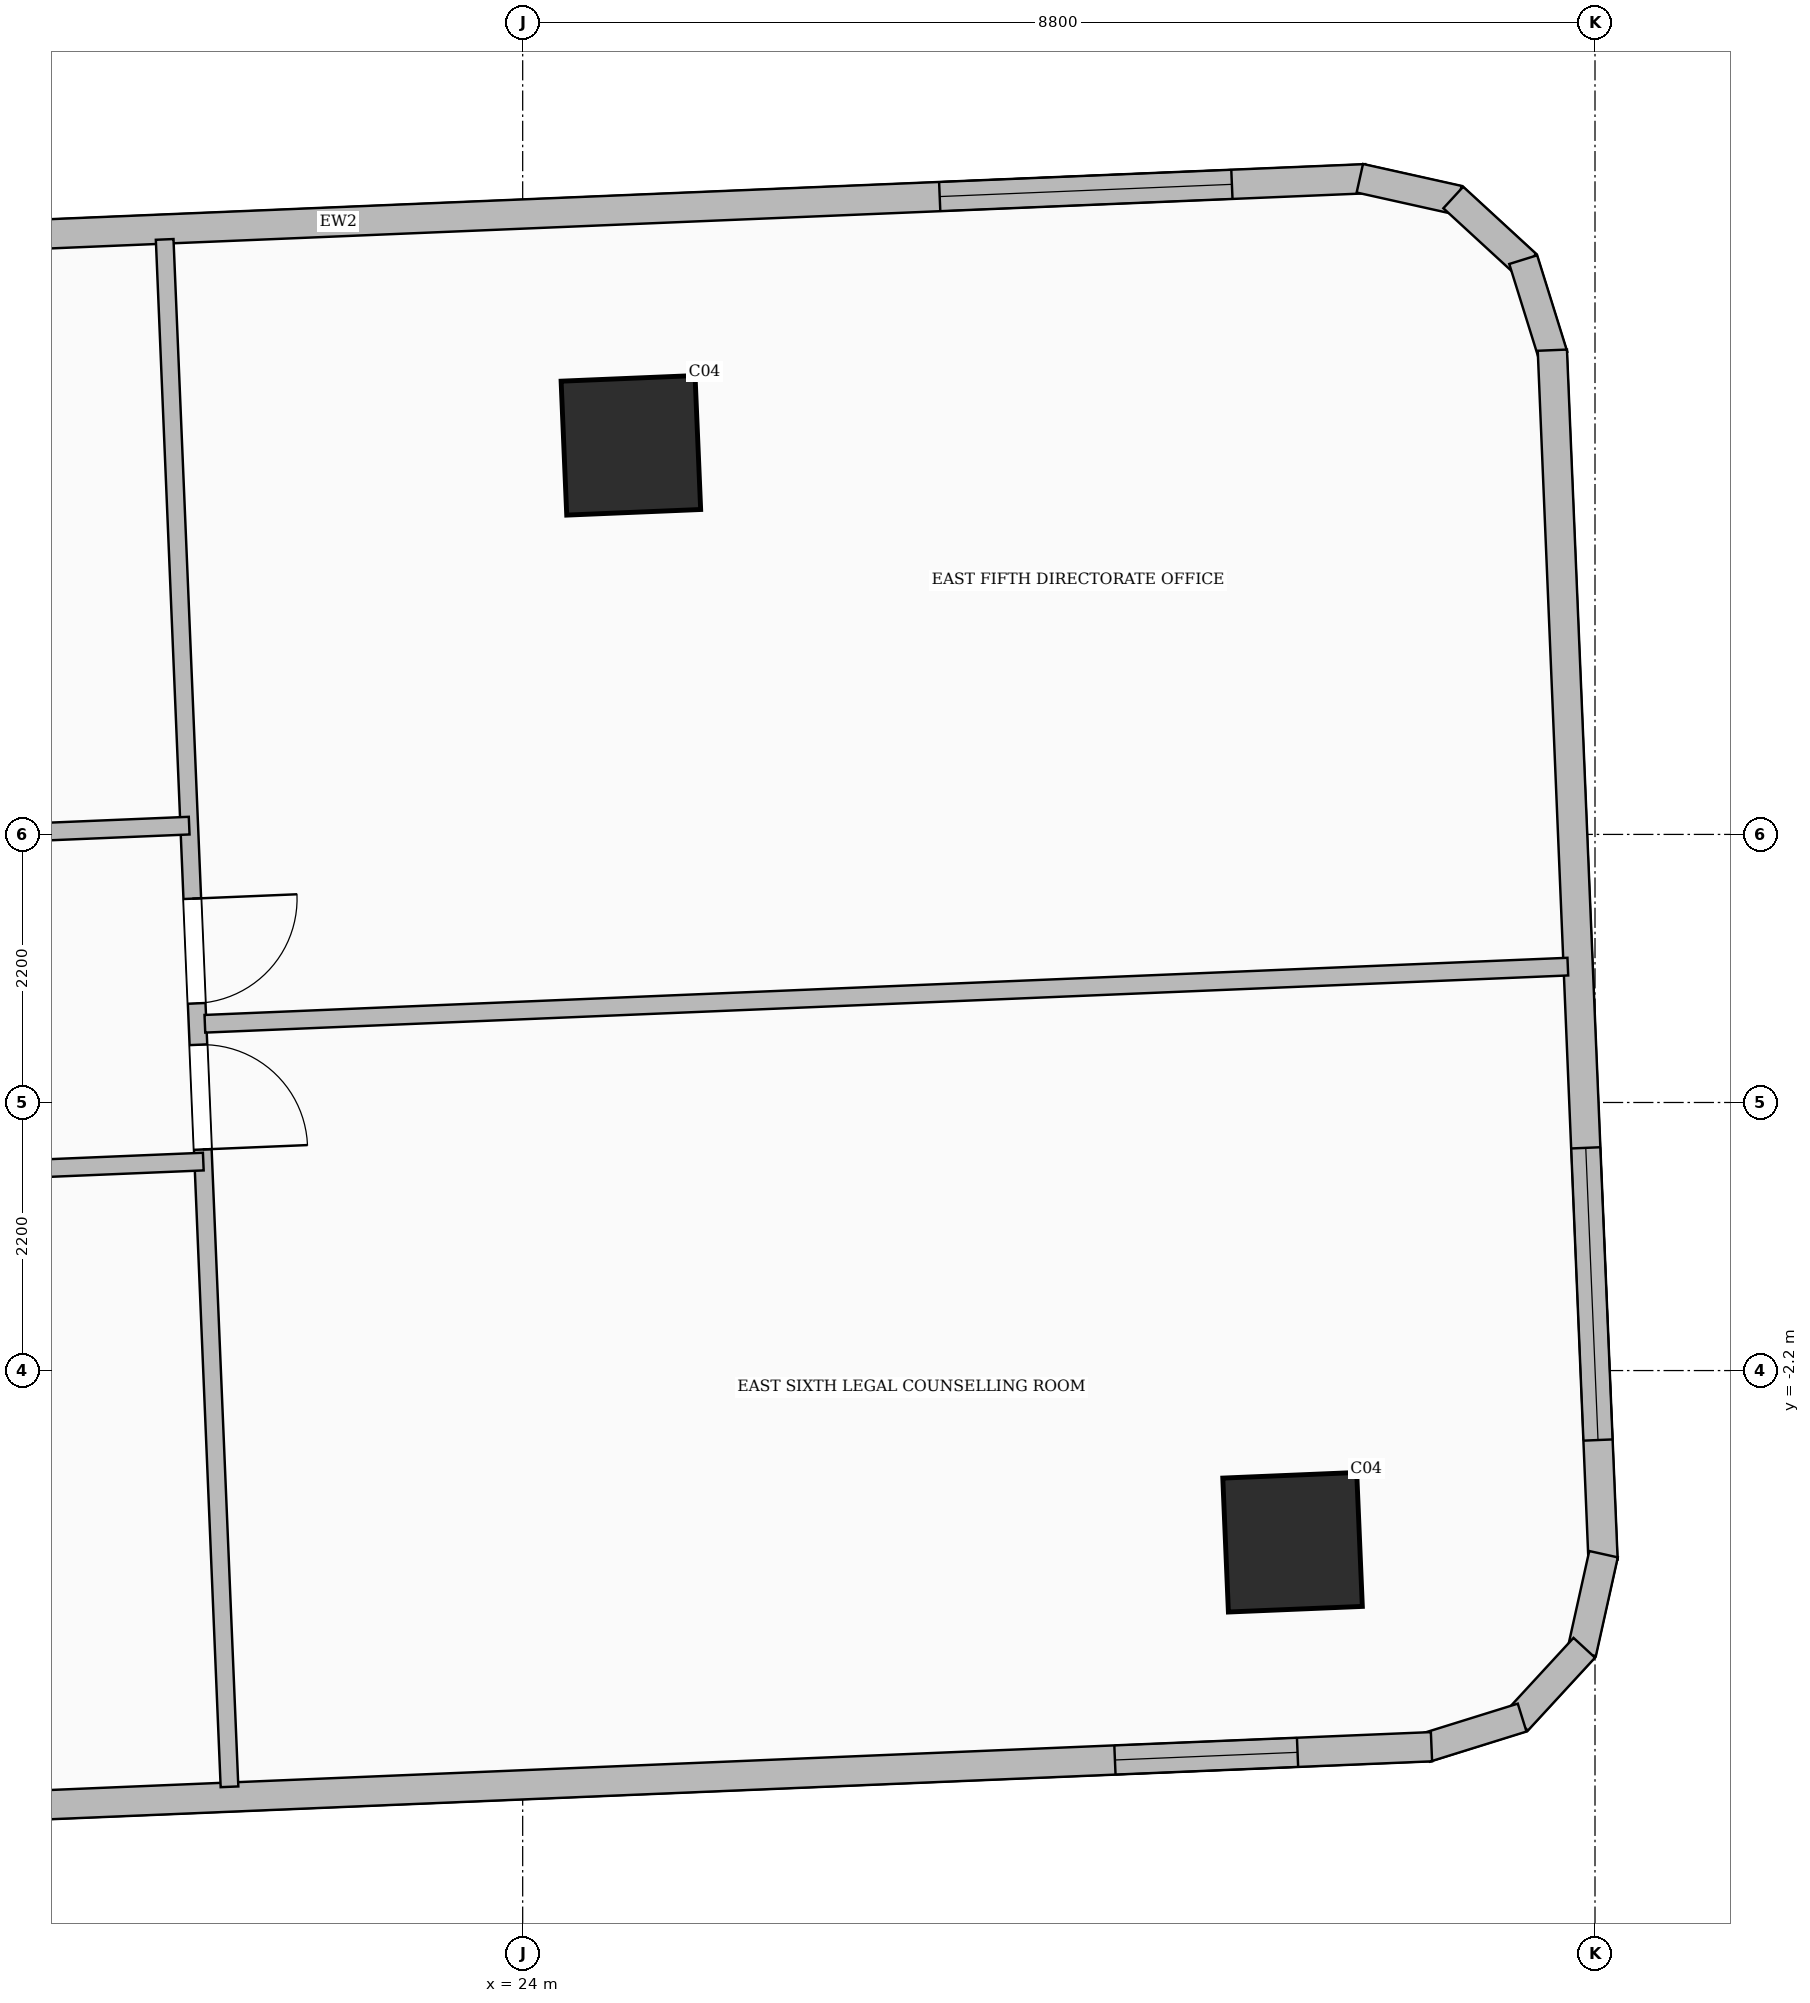
"""IFC4 building model, lengths in metres.
Left out: names, types, materials, properties, quantities, classifications, styles, units other than length and angle.
Written with IfcOpenShell. Run it as: python <this file> out.ifc"""

import sys

from ifc_helpers import new_model, si_unit, direction, frame, frame_2d, origin, origin_2d, place, context, subcontext, project, spatial, rectangle, extrude, element, fill, save


model = new_model("IFC4")
c1 = context("Model", 3, precision=1e-05, world=origin(), true_north=direction((0.0, 1.0)))
c2 = subcontext(c1, "Body", "Model", "MODEL_VIEW")
j1 = project(units=[si_unit("LENGTHUNIT", "METRE"), si_unit("PLANEANGLEUNIT", "RADIAN")], contexts=[c1])
p1 = place(None, origin())
s1 = spatial("IfcSite", under=j1, at=p1, CompositionType="ELEMENT")
p2 = place(p1, origin())
s2 = spatial("IfcBuilding", under=s1, at=p2, CompositionType="ELEMENT")
p3 = place(p2, frame((0.0, 0.0, 42.48)))
s3 = spatial("IfcBuildingStorey", under=s2, at=p3, CompositionType="ELEMENT", Elevation=42.48)
for number, where, z_axis, x_axis in (
    (1, (30.318, -3.609, 0.0), (0.0, 0.0, 1.0), (0.999, 0.042, 0.0)),
    (2, (24.888, 5.393, 0.0), (0.0, 0.0, 1.0), (0.999, 0.042, 0.0)),
):
    element("IfcColumn", number, at=place(p3, frame(where, z_axis=z_axis, x_axis=x_axis)), inside=s3, PredefinedType="COLUMN", context=c2, shape_type="SweptSolid", body=[
        extrude(rectangle(XDim=1.1, YDim=1.1, at=origin_2d()), origin(), (0.0, 0.0, 1.0), 3.6),
    ])
p4 = place(p3, frame((14.058, 6.875, 0.0), z_axis=(0.0, 0.0, 1.0), x_axis=(0.999124376175, 0.04183874918, 0.0)))
e3 = element("IfcWall", 3, at=p4, inside=s3, PredefinedType="SOLIDWALL", context=c2, shape_type="SweptSolid", body=[
    extrude(rectangle(XDim=16.876, YDim=0.24, at=frame_2d((8.438, 0.0))), origin(), (0.0, 0.0, 1.0), 3.34),
])
p5 = place(p4, frame((13.376, 0.0, 0.85)))
e4 = element("IfcOpeningElement", 4, at=p5, cuts=e3, PredefinedType="OPENING", context=c2, shape_type="SweptSolid", body=[
    extrude(rectangle(XDim=2.4, YDim=1.85, at=frame_2d((1.2, 0.925))), frame((0.0, 0.13, 0.0), z_axis=(0.0, -1.0, 0.0), x_axis=(1.0, 0.0, 0.0)), (0.0, 0.0, 1.0), 0.26),
])
p6 = place(p3, frame((30.87, 7.585, 0.0), z_axis=(0.0, 0.0, 1.0), x_axis=(0.976138507006, -0.217148831773, 0.0)))
e5 = element("IfcWall", 5, at=p6, inside=s3, PredefinedType="SOLIDWALL", context=c2, shape_type="SweptSolid", body=[
    extrude(rectangle(XDim=0.829, YDim=0.24, at=frame_2d((0.414, 0.0))), origin(), (0.0, 0.0, 1.0), 3.34),
])
p7 = place(p3, frame((31.637, 7.427, 0.0), z_axis=(0.0, 0.0, 1.0), x_axis=(0.73603262681, -0.676946063044, 0.0)))
e6 = element("IfcWall", 6, at=p7, inside=s3, PredefinedType="SOLIDWALL", context=c2, shape_type="SweptSolid", body=[
    extrude(rectangle(XDim=0.814, YDim=0.24, at=frame_2d((0.407, 0.0))), origin(), (0.0, 0.0, 1.0), 3.34),
])
p8 = place(p3, frame((32.211, 6.917, 0.0), z_axis=(0.0, 0.0, 1.0), x_axis=(0.297805793488, -0.954626476359, 0.0)))
e7 = element("IfcWall", 7, at=p8, inside=s3, PredefinedType="SOLIDWALL", context=c2, shape_type="SweptSolid", body=[
    extrude(rectangle(XDim=0.83, YDim=0.24, at=frame_2d((0.415, 0.0))), origin(), (0.0, 0.0, 1.0), 3.34),
])
p9 = place(p3, frame((32.45, 6.174, 0.0), z_axis=(0.0, 0.0, 1.0), x_axis=(0.041857368543, -0.999123596308, 0.0)))
e8 = element("IfcWall", 8, at=p9, inside=s3, PredefinedType="SOLIDWALL", context=c2, shape_type="SweptSolid", body=[
    extrude(rectangle(XDim=9.939, YDim=0.24, at=frame_2d((4.969, 0.0))), origin(), (0.0, 0.0, 1.0), 3.34),
])
p10 = place(p9, frame((6.552, 0.0, 0.85)))
e9 = element("IfcOpeningElement", 9, at=p10, cuts=e8, PredefinedType="OPENING", context=c2, shape_type="SweptSolid", body=[
    extrude(rectangle(XDim=2.4, YDim=1.65, at=frame_2d((1.2, 0.825))), frame((0.0, 0.13, 0.0), z_axis=(0.0, -1.0, 0.0), x_axis=(1.0, 0.0, 0.0)), (0.0, 0.0, 1.0), 0.26),
])
p11 = place(p3, frame((32.87, -3.707, 0.0), z_axis=(0.0, 0.0, 1.0), x_axis=(-0.21711735544, -0.976145508604, 0.0)))
e10 = element("IfcWall", 10, at=p11, inside=s3, PredefinedType="SOLIDWALL", context=c2, shape_type="SweptSolid", body=[
    extrude(rectangle(XDim=0.83, YDim=0.24, at=frame_2d((0.415, 0.0))), origin(), (0.0, 0.0, 1.0), 3.34),
])
p12 = place(p3, frame((32.712, -4.475, 0.0), z_axis=(0.0, 0.0, 1.0), x_axis=(-0.677693750404, -0.735344259965, 0.0)))
e11 = element("IfcWall", 11, at=p12, inside=s3, PredefinedType="SOLIDWALL", context=c2, shape_type="SweptSolid", body=[
    extrude(rectangle(XDim=0.813, YDim=0.24, at=frame_2d((0.406, 0.0))), origin(), (0.0, 0.0, 1.0), 3.34),
])
p13 = place(p3, frame((32.202, -5.048, 0.0), z_axis=(0.0, 0.0, 1.0), x_axis=(-0.954814146828, -0.297203541393, 0.0)))
e12 = element("IfcWall", 12, at=p13, inside=s3, PredefinedType="SOLIDWALL", context=c2, shape_type="SweptSolid", body=[
    extrude(rectangle(XDim=0.831, YDim=0.24, at=frame_2d((0.415, 0.0))), origin(), (0.0, 0.0, 1.0), 3.34),
])
p14 = place(p3, frame((31.458, -5.287, 0.0), z_axis=(0.0, 0.0, 1.0), x_axis=(-0.999122484842, -0.041883890494, 0.0)))
e13 = element("IfcWall", 13, at=p14, inside=s3, PredefinedType="SOLIDWALL", context=c2, shape_type="SweptSolid", body=[
    extrude(rectangle(XDim=16.875, YDim=0.24, at=frame_2d((8.438, 0.0))), origin(), (0.0, 0.0, 1.0), 3.34),
])
p15 = place(p14, frame((1.1, 0.0, 0.85)))
e14 = element("IfcOpeningElement", 14, at=p15, cuts=e13, PredefinedType="OPENING", context=c2, shape_type="SweptSolid", body=[
    extrude(rectangle(XDim=1.5, YDim=1.5, at=frame_2d((0.75, 0.75))), frame((0.0, 0.13, 0.0), z_axis=(0.0, -1.0, 0.0), x_axis=(1.0, 0.0, 0.0)), (0.0, 0.0, 1.0), 0.26),
])
p16 = place(p3, frame((21.263, 2.272, 0.0), z_axis=(0.0, 0.0, 1.0), x_axis=(-0.999124408039, -0.041837988246, 0.0)))
e15 = element("IfcWall", 15, at=p16, inside=s3, PredefinedType="PARTITIONING", context=c2, shape_type="SweptSolid", body=[
    extrude(rectangle(XDim=7.049, YDim=0.145, at=frame_2d((3.524, 0.0))), origin(), (0.0, 0.0, 1.0), 3.34),
])
p17 = place(p16, frame((3.074, 0.0, 0.0)))
e16 = element("IfcOpeningElement", 16, at=p17, cuts=e15, PredefinedType="OPENING", context=c2, shape_type="SweptSolid", body=[
    extrude(rectangle(XDim=0.9, YDim=2.06, at=frame_2d((0.45, 1.03))), frame((0.0, 0.083, 0.0), z_axis=(0.0, -1.0, 0.0), x_axis=(1.0, 0.0, 0.0)), (0.0, 0.0, 1.0), 0.165),
])
p18 = place(p3, frame((14.335, -0.78, 0.0), z_axis=(0.0, 0.0, 1.0), x_axis=(0.999124650485, 0.041832198038, 0.0)))
e17 = element("IfcWall", 17, at=p18, inside=s3, PredefinedType="PARTITIONING", context=c2, shape_type="SweptSolid", body=[
    extrude(rectangle(XDim=7.05, YDim=0.145, at=frame_2d((3.525, 0.0))), origin(), (0.0, 0.0, 1.0), 3.34),
])
p19 = place(p18, frame((3.075, 0.0, 0.0)))
e18 = element("IfcOpeningElement", 18, at=p19, cuts=e17, PredefinedType="OPENING", context=c2, shape_type="SweptSolid", body=[
    extrude(rectangle(XDim=0.9, YDim=2.06, at=frame_2d((0.45, 1.03))), frame((0.0, 0.083, 0.0), z_axis=(0.0, -1.0, 0.0), x_axis=(1.0, 0.0, 0.0)), (0.0, 0.0, 1.0), 0.165),
])
p20 = place(p3, frame((21.392, 0.646, 0.0), z_axis=(0.0, 0.0, 1.0), x_axis=(0.999122039379, 0.041894515479, 0.0)))
e19 = element("IfcWall", 19, at=p20, inside=s3, PredefinedType="PARTITIONING", context=c2, shape_type="SweptSolid", body=[
    extrude(rectangle(XDim=11.195, YDim=0.145, at=frame_2d((5.597, 0.0))), origin(), (0.0, 0.0, 1.0), 2.832),
])
p21 = place(p3, frame((21.062, 7.083, 0.0), z_axis=(0.0, 0.0, 1.0), x_axis=(0.041855051962, -0.999123693356, 0.0)))
e20 = element("IfcWall", 20, at=p21, inside=s3, PredefinedType="PARTITIONING", context=c2, shape_type="SweptSolid", body=[
    extrude(rectangle(XDim=12.71, YDim=0.145, at=frame_2d((6.355, 0.0))), origin(), (0.0, 0.0, 1.0), 2.421),
])
p22 = place(p21, frame((6.615, 0.0, 0.0)))
e21 = element("IfcOpeningElement", 21, at=p22, cuts=e20, PredefinedType="OPENING", context=c2, shape_type="SweptSolid", body=[
    extrude(rectangle(XDim=0.86, YDim=2.04, at=frame_2d((0.43, 1.02))), frame((0.0, 0.083, 0.0), z_axis=(0.0, -1.0, 0.0), x_axis=(1.0, 0.0, 0.0)), (0.0, 0.0, 1.0), 0.165),
])
p23 = place(p21, frame((5.415, 0.0, 0.0)))
e22 = element("IfcOpeningElement", 22, at=p23, cuts=e20, PredefinedType="OPENING", context=c2, shape_type="SweptSolid", body=[
    extrude(rectangle(XDim=0.86, YDim=2.04, at=frame_2d((0.43, 1.02))), frame((0.0, 0.083, 0.0), z_axis=(0.0, -1.0, 0.0), x_axis=(1.0, 0.0, 0.0)), (0.0, 0.0, 1.0), 0.165),
])
p24 = place(p5, origin())
e23 = element("IfcWindow", 23, at=p24, inside=s3, PartitioningType="SINGLE_PANEL", PredefinedType="WINDOW", context=c2, shape_type="SweptSolid", body=[
    extrude(rectangle(XDim=2.4, YDim=1.85, at=frame_2d((1.2, 0.925))), frame((0.0, 0.03, 0.0), z_axis=(0.0, -1.0, 0.0), x_axis=(1.0, 0.0, 0.0)), (0.0, 0.0, 1.0), 0.06),
])
fill(e4, e23)
p25 = place(p10, origin())
e24 = element("IfcWindow", 24, at=p25, inside=s3, PartitioningType="SINGLE_PANEL", PredefinedType="WINDOW", context=c2, shape_type="SweptSolid", body=[
    extrude(rectangle(XDim=2.4, YDim=1.65, at=frame_2d((1.2, 0.825))), frame((0.0, 0.03, 0.0), z_axis=(0.0, -1.0, 0.0), x_axis=(1.0, 0.0, 0.0)), (0.0, 0.0, 1.0), 0.06),
])
fill(e9, e24)
p26 = place(p15, origin())
e25 = element("IfcWindow", 25, at=p26, inside=s3, PartitioningType="SINGLE_PANEL", PredefinedType="WINDOW", context=c2, shape_type="SweptSolid", body=[
    extrude(rectangle(XDim=1.5, YDim=1.5, at=frame_2d((0.75, 0.75))), frame((0.0, 0.03, 0.0), z_axis=(0.0, -1.0, 0.0), x_axis=(1.0, 0.0, 0.0)), (0.0, 0.0, 1.0), 0.06),
])
fill(e14, e25)
p27 = place(p22, origin())
e26 = element("IfcDoor", 26, at=p27, inside=s3, OperationType="SINGLE_SWING_RIGHT", PredefinedType="DOOR", context=c2, shape_type="SweptSolid", body=[
    extrude(rectangle(XDim=0.86, YDim=2.04, at=frame_2d((0.43, 1.02))), frame((0.0, 0.025, 0.0), z_axis=(0.0, -1.0, 0.0), x_axis=(1.0, 0.0, 0.0)), (0.0, 0.0, 1.0), 0.05),
])
fill(e21, e26)
p28 = place(p23, origin())
e27 = element("IfcDoor", 27, at=p28, inside=s3, OperationType="SINGLE_SWING_LEFT", PredefinedType="DOOR", context=c2, shape_type="SweptSolid", body=[
    extrude(rectangle(XDim=0.86, YDim=2.04, at=frame_2d((0.43, 1.02))), frame((0.0, 0.025, 0.0), z_axis=(0.0, -1.0, 0.0), x_axis=(1.0, 0.0, 0.0)), (0.0, 0.0, 1.0), 0.05),
])
fill(e22, e27)
save(model, sys.argv[1])
